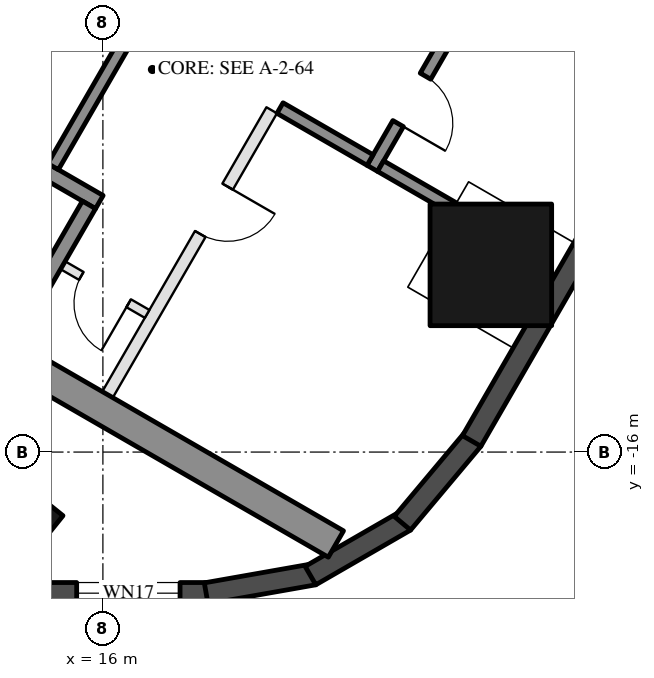
"""IFC4 building model, lengths in metres.
Left out: names, types, materials, properties, quantities, classifications, styles, units other than length and angle.
Written with IfcOpenShell. Run it as: python <this file> out.ifc"""

import sys

from ifc_helpers import new_model, si_unit, direction, frame, frame_2d, origin, origin_2d, place, context, subcontext, project, spatial, rectangle, hollow_rectangle, extrude, boolean, halfspace, element, fill, save


model = new_model("IFC4")
c1 = context("Model", 3, precision=1e-05, world=origin(), true_north=direction((0.0, 1.0)))
c2 = subcontext(c1, "Body", "Model", "MODEL_VIEW")
j1 = project(units=[si_unit("LENGTHUNIT", "METRE"), si_unit("PLANEANGLEUNIT", "RADIAN")], contexts=[c1])
p1 = place(None, origin())
s1 = spatial("IfcSite", under=j1, at=p1, CompositionType="ELEMENT")
p2 = place(p1, origin())
s2 = spatial("IfcBuilding", under=s1, at=p2, CompositionType="ELEMENT")
p3 = place(p2, frame((0.0, 0.0, 276.3)))
s3 = spatial("IfcBuildingStorey", under=s2, at=p3, CompositionType="ELEMENT", Elevation=276.3)
p4 = place(p3, frame((14.887, -17.096, 0.0), z_axis=(-0.121071080606, 0.15033532041, 0.981193704055), x_axis=(0.992604301044, 0.009512970783, 0.12102150609)))
e1 = element("IfcColumn", 1, at=p4, inside=s3, PredefinedType="COLUMN", context=c2, shape_type="SweptSolid", body=[
    boolean("DIFFERENCE", boolean("DIFFERENCE", extrude(hollow_rectangle(XDim=0.65, YDim=0.65, WallThickness=0.03, at=origin_2d()), origin(), (0.0, 0.0, 1.0), 3.771), halfspace(frame((0.0, 0.0, 0.047), z_axis=(0.0, 0.0, 1.0), x_axis=(1.0, 0.0, 0.0)), True)), halfspace(frame((0.0, 0.0, 3.724), z_axis=(0.0, 0.0, 1.0), x_axis=(1.0, 0.0, 0.0)), False)),
])
p5 = place(p3, frame((22.38, -12.921, 0.0), z_axis=(-0.190406849863, 0.109944185114, 0.975529347424), x_axis=(-0.499999219142, -0.866025854536, 1.1512328e-05)))
e2 = element("IfcColumn", 2, at=p5, inside=s3, PredefinedType="COLUMN", context=c2, shape_type="SweptSolid", body=[
    boolean("DIFFERENCE", boolean("DIFFERENCE", extrude(hollow_rectangle(XDim=2.0, YDim=2.0, WallThickness=0.05, at=origin_2d()), origin(), (0.0, 0.0, 1.0), 3.793), halfspace(frame((0.0, 0.0, 0.113), z_axis=(0.0, 0.0, 1.0), x_axis=(1.0, 0.0, 0.0)), True)), halfspace(frame((0.0, 0.0, 3.679), z_axis=(0.0, 0.0, 1.0), x_axis=(1.0, 0.0, 0.0)), False)),
])
p6 = place(p3, frame((13.987, -18.321, 0.0), z_axis=(0.0, 0.0, 1.0), x_axis=(1.0, 0.0, 0.0)))
e3 = element("IfcWall", 3, at=p6, inside=s3, PredefinedType="SOLIDWALL", context=c2, shape_type="SweptSolid", body=[
    extrude(rectangle(XDim=3.742, YDim=0.35, at=frame_2d((1.871, 0.0))), origin(), (0.0, 0.0, 1.0), 3.55),
])
p7 = place(p6, frame((1.582, 0.0, 0.3)))
e4 = element("IfcOpeningElement", 4, at=p7, cuts=e3, PredefinedType="OPENING", context=c2, shape_type="SweptSolid", body=[
    extrude(rectangle(XDim=1.7, YDim=2.65, at=frame_2d((0.85, 1.325))), frame((0.0, 0.185, 0.0), z_axis=(0.0, -1.0, 0.0), x_axis=(1.0, 0.0, 0.0)), (0.0, 0.0, 1.0), 0.37),
])
p8 = place(p3, frame((17.698, -18.323, 0.0), z_axis=(0.0, 0.0, 1.0), x_axis=(0.984810858511, 0.173630564586, 0.0)))
e5 = element("IfcWall", 5, at=p8, inside=s3, PredefinedType="SOLIDWALL", context=c2, shape_type="SweptSolid", body=[
    extrude(rectangle(XDim=1.8, YDim=0.35, at=frame_2d((0.9, 0.0))), origin(), (0.0, 0.0, 1.0), 3.55),
])
p9 = place(p3, frame((19.414, -18.032, 0.0), z_axis=(0.0, 0.0, 1.0), x_axis=(0.866047807691, 0.499961193289, 0.0)))
e6 = element("IfcWall", 6, at=p9, inside=s3, PredefinedType="SOLIDWALL", context=c2, shape_type="SweptSolid", body=[
    extrude(rectangle(XDim=1.8, YDim=0.35, at=frame_2d((0.9, 0.0))), origin(), (0.0, 0.0, 1.0), 3.55),
])
p10 = place(p3, frame((20.926, -17.171, 0.0), z_axis=(0.0, 0.0, 1.0), x_axis=(0.642756114672, 0.766070869471, 0.0)))
e7 = element("IfcWall", 7, at=p10, inside=s3, PredefinedType="SOLIDWALL", context=c2, shape_type="SweptSolid", body=[
    extrude(rectangle(XDim=1.8, YDim=0.35, at=frame_2d((0.9, 0.0))), origin(), (0.0, 0.0, 1.0), 3.55),
])
p11 = place(p3, frame((22.065, -15.817, 0.0), z_axis=(0.0, 0.0, 1.0), x_axis=(0.500025039717, 0.866010946615, 0.0)))
e8 = element("IfcWall", 8, at=p11, inside=s3, PredefinedType="SOLIDWALL", context=c2, shape_type="SweptSolid", body=[
    extrude(rectangle(XDim=5.331, YDim=0.35, at=frame_2d((2.666, 0.0))), origin(), (0.0, 0.0, 1.0), 3.55),
])
p12 = place(p3, frame((8.547, -10.997, 0.0), z_axis=(0.0, 0.0, 1.0), x_axis=(0.866030218785, -0.499991660082, 0.0)))
e9 = element("IfcWall", 9, at=p12, inside=s3, PredefinedType="SHEAR", context=c2, shape_type="SweptSolid", body=[
    extrude(rectangle(XDim=13.031, YDim=0.5, at=frame_2d((6.516, 0.0))), origin(), (0.0, 0.0, 1.0), 3.5),
])
p13 = place(p3, frame((10.356, -8.664, 0.0), z_axis=(0.0, 0.0, 1.0), x_axis=(0.866028629588, -0.499994412703, 0.0)))
e10 = element("IfcWall", 10, at=p13, inside=s3, PredefinedType="SHEAR", context=c2, shape_type="SweptSolid", body=[
    extrude(rectangle(XDim=6.45, YDim=0.25, at=frame_2d((3.225, 0.0))), origin(), (0.0, 0.0, 1.0), 3.5),
])
p14 = place(p13, frame((0.3, 0.0, 0.0)))
e11 = element("IfcOpeningElement", 11, at=p14, cuts=e10, PredefinedType="OPENING", context=c2, shape_type="SweptSolid", body=[
    extrude(rectangle(XDim=1.0, YDim=2.1, at=frame_2d((0.5, 1.05))), frame((0.0, 0.135, 0.0), z_axis=(0.0, -1.0, 0.0), x_axis=(1.0, 0.0, 0.0)), (0.0, 0.0, 1.0), 0.27),
])
p15 = place(p3, frame((14.496, -14.143, 0.0), z_axis=(0.0, 0.0, 1.0), x_axis=(0.500062241894, 0.865989465428, 0.0)))
e12 = element("IfcWall", 12, at=p15, inside=s3, PredefinedType="SHEAR", context=c2, shape_type="SweptSolid", body=[
    extrude(rectangle(XDim=2.55, YDim=0.25, at=frame_2d((1.275, 0.0))), origin(), (0.0, 0.0, 1.0), 3.5),
])
p16 = place(p3, frame((15.181, -11.305, 0.0), z_axis=(0.0, 0.0, 1.0), x_axis=(0.49994636267, 0.866056369097, 0.0)))
e13 = element("IfcWall", 13, at=p16, inside=s3, PredefinedType="SHEAR", context=c2, shape_type="SweptSolid", body=[
    extrude(rectangle(XDim=2.8, YDim=0.2, at=frame_2d((1.4, 0.0))), origin(), (0.0, 0.0, 1.0), 3.5),
])
p17 = place(p3, frame((20.43, -11.333, 0.0), z_axis=(0.0, 0.0, 1.0), x_axis=(0.500001309137, 0.866024647952, 0.0)))
e14 = element("IfcWall", 14, at=p17, inside=s3, PredefinedType="SHEAR", context=c2, shape_type="SweptSolid", body=[
    extrude(rectangle(XDim=2.4, YDim=0.2, at=frame_2d((1.2, 0.0))), origin(), (0.0, 0.0, 1.0), 3.5),
])
p18 = place(p17, frame((0.85, 0.0, 0.0)))
e15 = element("IfcOpeningElement", 15, at=p18, cuts=e14, PredefinedType="OPENING", context=c2, shape_type="SweptSolid", body=[
    extrude(rectangle(XDim=0.9, YDim=2.1, at=frame_2d((0.45, 1.05))), frame((0.0, 0.11, 0.0), z_axis=(0.0, -1.0, 0.0), x_axis=(1.0, 0.0, 0.0)), (0.0, 0.0, 1.0), 0.22),
])
p19 = place(p3, frame((18.913, -10.342, 0.0), z_axis=(0.0, 0.0, 1.0), x_axis=(0.866038183914, -0.499977863513, 0.0)))
e16 = element("IfcWall", 16, at=p19, inside=s3, PredefinedType="SHEAR", context=c2, shape_type="SweptSolid", body=[
    extrude(rectangle(XDim=1.71, YDim=0.2, at=frame_2d((0.855, 0.0))), origin(), (0.0, 0.0, 1.0), 3.5),
])
p20 = place(p3, frame((20.567, -11.297, 0.0), z_axis=(0.0, 0.0, 1.0), x_axis=(0.866094443108, -0.499880401313, 0.0)))
e17 = element("IfcWall", 17, at=p20, inside=s3, PredefinedType="SHEAR", context=c2, shape_type="SweptSolid", body=[
    extrude(rectangle(XDim=1.383, YDim=0.2, at=frame_2d((0.691, 0.0))), origin(), (0.0, 0.0, 1.0), 3.5),
])
p21 = place(p3, frame((16.076, -15.055, 0.0), z_axis=(0.0, 0.0, 1.0), x_axis=(0.499995103361, 0.866028230842, 0.0)))
e18 = element("IfcWall", 18, at=p21, inside=s3, PredefinedType="PARTITIONING", context=c2, shape_type="SweptSolid", body=[
    extrude(rectangle(XDim=5.4, YDim=0.2, at=frame_2d((2.7, 0.0))), origin(), (0.0, 0.0, 1.0), 3.5),
])
p22 = place(p21, frame((3.05, 0.0, 0.0)))
e19 = element("IfcOpeningElement", 19, at=p22, cuts=e18, PredefinedType="OPENING", context=c2, shape_type="SweptSolid", body=[
    extrude(rectangle(XDim=0.9, YDim=2.1, at=frame_2d((0.45, 1.05))), frame((0.0, 0.11, 0.0), z_axis=(0.0, -1.0, 0.0), x_axis=(1.0, 0.0, 0.0)), (0.0, 0.0, 1.0), 0.22),
])
p23 = place(p3, frame((15.342, -12.928, 0.0), z_axis=(0.0, 0.0, 1.0), x_axis=(0.865989903783, -0.500061482766, 0.0)))
e20 = element("IfcWall", 20, at=p23, inside=s3, PredefinedType="PARTITIONING", context=c2, shape_type="SweptSolid", body=[
    extrude(rectangle(XDim=1.6, YDim=0.15, at=frame_2d((0.8, 0.0))), origin(), (0.0, 0.0, 1.0), 3.5),
])
p24 = place(p23, frame((0.35, 0.0, 0.0)))
e21 = element("IfcOpeningElement", 21, at=p24, cuts=e20, PredefinedType="OPENING", context=c2, shape_type="SweptSolid", body=[
    extrude(rectangle(XDim=0.9, YDim=2.1, at=frame_2d((0.45, 1.05))), frame((0.0, 0.085, 0.0), z_axis=(0.0, -1.0, 0.0), x_axis=(1.0, 0.0, 0.0)), (0.0, 0.0, 1.0), 0.17),
])
p25 = place(p7, origin())
e22 = element("IfcWindow", 22, at=p25, inside=s3, PartitioningType="SINGLE_PANEL", PredefinedType="WINDOW", context=c2, shape_type="SweptSolid", body=[
    extrude(rectangle(XDim=1.7, YDim=2.65, at=frame_2d((0.85, 1.325))), frame((0.0, 0.03, 0.0), z_axis=(0.0, -1.0, 0.0), x_axis=(1.0, 0.0, 0.0)), (0.0, 0.0, 1.0), 0.06),
])
fill(e4, e22)
p26 = place(p24, frame((0.9, 0.0, 0.0), z_axis=(0.0, 0.0, 1.0), x_axis=(-1.0, 0.0, 0.0)))
e23 = element("IfcDoor", 23, at=p26, inside=s3, OperationType="SINGLE_SWING_LEFT", PredefinedType="DOOR", context=c2, shape_type="SweptSolid", body=[
    extrude(rectangle(XDim=0.9, YDim=2.1, at=frame_2d((0.45, 1.05))), frame((0.0, 0.025, 0.0), z_axis=(0.0, -1.0, 0.0), x_axis=(1.0, 0.0, 0.0)), (0.0, 0.0, 1.0), 0.05),
])
fill(e21, e23)
p27 = place(p18, frame((0.9, 0.0, 0.0), z_axis=(0.0, 0.0, 1.0), x_axis=(-1.0, 0.0, 0.0)))
e24 = element("IfcDoor", 24, at=p27, inside=s3, OperationType="SINGLE_SWING_RIGHT", PredefinedType="DOOR", context=c2, shape_type="SweptSolid", body=[
    extrude(rectangle(XDim=0.9, YDim=2.1, at=frame_2d((0.45, 1.05))), frame((0.0, 0.025, 0.0), z_axis=(0.0, -1.0, 0.0), x_axis=(1.0, 0.0, 0.0)), (0.0, 0.0, 1.0), 0.05),
])
fill(e15, e24)
p28 = place(p22, frame((0.9, 0.0, 0.0), z_axis=(0.0, 0.0, 1.0), x_axis=(-1.0, 0.0, 0.0)))
e25 = element("IfcDoor", 25, at=p28, inside=s3, OperationType="SINGLE_SWING_LEFT", PredefinedType="DOOR", context=c2, shape_type="SweptSolid", body=[
    extrude(rectangle(XDim=0.9, YDim=2.1, at=frame_2d((0.45, 1.05))), frame((0.0, 0.025, 0.0), z_axis=(0.0, -1.0, 0.0), x_axis=(1.0, 0.0, 0.0)), (0.0, 0.0, 1.0), 0.05),
])
fill(e19, e25)
save(model, sys.argv[1])
